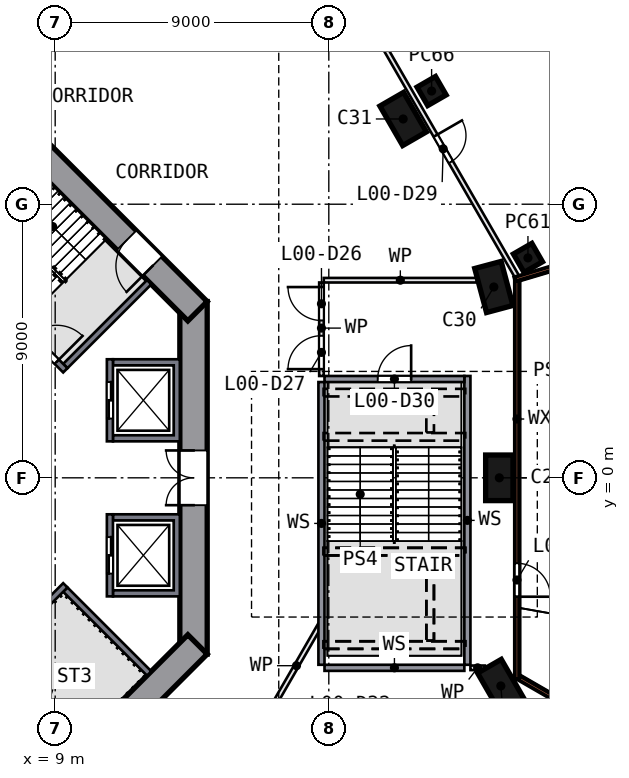
"""IFC4 building model, lengths in metres.
Left out: names, types, materials, properties, quantities, classifications, styles, units other than length and angle.
Written with IfcOpenShell. Run it as: python <this file> out.ifc"""

import sys

from ifc_helpers import new_model, si_unit, direction, frame, frame_2d, origin, origin_2d, place, context, subcontext, project, spatial, polyline, rectangle, outline, extrude, element, fill, save


model = new_model("IFC4")
c1 = context("Model", 3, precision=1e-05, world=origin(), true_north=direction((0.0, 1.0)))
c2 = subcontext(c1, "Body", "Model", "MODEL_VIEW")
j1 = project(units=[si_unit("LENGTHUNIT", "METRE"), si_unit("PLANEANGLEUNIT", "RADIAN")], contexts=[c1])
p1 = place(None, origin())
s1 = spatial("IfcSite", under=j1, at=p1, CompositionType="ELEMENT")
p2 = place(p1, origin())
s2 = spatial("IfcBuilding", under=s1, at=p2, CompositionType="ELEMENT")
p3 = place(p2, origin())
s3 = spatial("IfcBuildingStorey", under=s2, at=p3, CompositionType="ELEMENT", Elevation=0.0)
for number, where, z_axis, x_axis in (
    (1, (23.658, -6.846, 0.0), (0.0, 0.0, 1.0), (0.5, -0.866, 0.0)),
    (2, (23.608, 0.0, 0.0), (0.0, 0.0, 1.0), (0.0, 1.0, 0.0)),
    (3, (23.428, 6.278, 0.0), (0.0, 0.0, 1.0), (0.259, -0.966, 0.0)),
    (4, (20.445, 11.804, 0.0), (0.0, 0.0, 1.0), (-0.5, 0.866, 0.0)),
):
    element("IfcColumn", number, at=place(p3, frame(where, z_axis=z_axis, x_axis=x_axis)), inside=s3, PredefinedType="COLUMN", context=c2, shape_type="SweptSolid", body=[
        extrude(rectangle(XDim=1.5, YDim=0.9, at=origin_2d()), origin(), (0.0, 0.0, 1.0), 7.55),
    ])
p4 = place(p3, frame((13.55, -5.799, 0.0), z_axis=(0.0, 0.0, 1.0), x_axis=(0.0, 1.0, 0.0)))
e5 = element("IfcWall", 5, at=p4, inside=s3, PredefinedType="SHEAR", context=c2, shape_type="SweptSolid", body=[
    extrude(rectangle(XDim=11.598, YDim=0.9, at=frame_2d((5.799, 0.0))), origin(), (0.0, 0.0, 1.0), 8.0),
])
p5 = place(p4, frame((4.899, 0.0, 0.0)))
e6 = element("IfcOpeningElement", 6, at=p5, cuts=e5, PredefinedType="OPENING", context=c2, shape_type="SweptSolid", body=[
    extrude(rectangle(XDim=1.8, YDim=2.1, at=frame_2d((0.9, 1.05))), frame((0.0, 0.46, 0.0), z_axis=(0.0, -1.0, 0.0), x_axis=(1.0, 0.0, 0.0)), (0.0, 0.0, 1.0), 0.92),
])
p6 = place(p3, frame((13.682, 5.481, 0.0), z_axis=(0.0, 0.0, 1.0), x_axis=(-0.707106781, 0.707106781, 0.0)))
e7 = element("IfcWall", 7, at=p6, inside=s3, PredefinedType="SHEAR", context=c2, shape_type="SweptSolid", body=[
    extrude(rectangle(XDim=11.598, YDim=0.9, at=frame_2d((5.799, 0.0))), origin(), (0.0, 0.0, 1.0), 8.0),
])
p7 = place(p6, frame((2.099, 0.0, 0.0)))
e8 = element("IfcOpeningElement", 8, at=p7, cuts=e7, PredefinedType="OPENING", context=c2, shape_type="SweptSolid", body=[
    extrude(rectangle(XDim=1.2, YDim=2.1, at=frame_2d((0.6, 1.05))), frame((0.0, 0.46, 0.0), z_axis=(0.0, -1.0, 0.0), x_axis=(1.0, 0.0, 0.0)), (0.0, 0.0, 1.0), 0.92),
])
p8 = place(p3, frame((5.481, -13.682, 0.0), z_axis=(0.0, 0.0, 1.0), x_axis=(0.707106781, 0.707106781, 0.0)))
e9 = element("IfcWall", 9, at=p8, inside=s3, PredefinedType="SHEAR", context=c2, shape_type="SweptSolid", body=[
    extrude(rectangle(XDim=11.598, YDim=0.9, at=frame_2d((5.799, 0.0))), origin(), (0.0, 0.0, 1.0), 8.0),
])
p9 = place(p8, frame((2.099, 0.0, 0.0)))
e10 = element("IfcOpeningElement", 10, at=p9, cuts=e9, PredefinedType="OPENING", context=c2, shape_type="SweptSolid", body=[
    extrude(rectangle(XDim=1.2, YDim=2.1, at=frame_2d((0.6, 1.05))), frame((0.0, 0.46, 0.0), z_axis=(0.0, -1.0, 0.0), x_axis=(1.0, 0.0, 0.0)), (0.0, 0.0, 1.0), 0.92),
])
for number, where, z_axis, x_axis in (
    (11, (24.55, 7.234, 0.0), (0.0, 0.0, 1.0), (0.866, 0.5, 0.0)),
    (12, (21.381, 12.723, 0.0), (0.0, 0.0, 1.0), (0.866, 0.5, 0.0)),
):
    element("IfcColumn", number, at=place(p3, frame(where, z_axis=z_axis, x_axis=x_axis)), inside=s3, PredefinedType="COLUMN", context=c2, shape_type="SweptSolid", body=[
        extrude(rectangle(XDim=0.7, YDim=0.7, at=origin_2d()), origin(), (0.0, 0.0, 1.0), 8.0),
    ])
p10 = place(p3, frame((33.751, -12.062, 0.0), z_axis=(0.0, 0.0, 1.0), x_axis=(-0.86602647, 0.499998154, 0.0)))
e13 = element("IfcWall", 13, at=p10, inside=s3, PredefinedType="SOLIDWALL", context=c2, shape_type="SweptSolid", body=[
    extrude(rectangle(XDim=10.961, YDim=0.14, at=frame_2d((5.481, 0.0))), origin(), (0.0, 0.0, 1.0), 7.55),
])
p11 = place(p10, frame((6.702, 0.0, 0.15)))
e14 = element("IfcOpeningElement", 14, at=p11, cuts=e13, PredefinedType="OPENING", context=c2, shape_type="SweptSolid", body=[
    extrude(rectangle(XDim=3.0, YDim=4.2, at=frame_2d((1.5, 2.1))), frame((0.0, 0.08, 0.0), z_axis=(0.0, -1.0, 0.0), x_axis=(1.0, 0.0, 0.0)), (0.0, 0.0, 1.0), 0.16),
])
p12 = place(p3, frame((24.188, 6.479, 0.0), z_axis=(0.0, 0.0, 1.0), x_axis=(0.0, -1.0, 0.0)))
e15 = element("IfcWall", 15, at=p12, inside=s3, PredefinedType="SOLIDWALL", context=c2, shape_type="SweptSolid", body=[
    extrude(rectangle(XDim=13.1, YDim=0.14, at=frame_2d((6.55, 0.0))), origin(), (0.0, 0.0, 1.0), 7.55),
])
p13 = place(p12, frame((9.29, 0.0, 0.0)))
e16 = element("IfcOpeningElement", 16, at=p13, cuts=e15, PredefinedType="OPENING", context=c2, shape_type="SweptSolid", body=[
    extrude(rectangle(XDim=1.1, YDim=2.4, at=frame_2d((0.55, 1.2))), frame((0.0, 0.08, 0.0), z_axis=(0.0, -1.0, 0.0), x_axis=(1.0, 0.0, 0.0)), (0.0, 0.0, 1.0), 0.16),
])
p14 = place(p3, frame((24.118, 6.531, 0.0), z_axis=(0.0, 0.0, 1.0), x_axis=(0.958329382, 0.28566553, 0.0)))
e17 = element("IfcWall", 17, at=p14, inside=s3, PredefinedType="SOLIDWALL", context=c2, shape_type="SweptSolid", body=[
    extrude(rectangle(XDim=12.398, YDim=0.14, at=frame_2d((6.199, 0.0))), origin(), (0.0, 0.0, 1.0), 7.55),
])
p15 = place(p3, origin())
e18 = element("IfcWall", 18, at=p15, inside=s3, PredefinedType="SOLIDWALL", context=c2, shape_type="SweptSolid", body=[
    extrude(outline(polyline([(13.1, -3.9), (10.9, -3.9), (10.9, -3.7), (12.9, -3.7), (12.9, -1.4), (10.9, -1.4), (10.9, -1.2), (13.1, -1.2), (13.1, -3.9)])), origin(), (0.0, 0.0, 1.0), 7.55),
])
p16 = place(p3, frame((10.8, -1.2, 0.0), z_axis=(0.0, 0.0, 1.0), x_axis=(0.0, -1.0, 0.0)))
e19 = element("IfcWall", 19, at=p16, inside=s3, PredefinedType="SOLIDWALL", context=c2, shape_type="SweptSolid", body=[
    extrude(rectangle(XDim=2.7, YDim=0.2, at=frame_2d((1.35, 0.0))), origin(), (0.0, 0.0, 1.0), 7.55),
])
p17 = place(p16, frame((0.75, 0.0, 0.0)))
e20 = element("IfcOpeningElement", 20, at=p17, cuts=e19, PredefinedType="OPENING", context=c2, shape_type="SweptSolid", body=[
    extrude(rectangle(XDim=1.2, YDim=2.1, at=frame_2d((0.6, 1.05))), frame((0.0, 0.11, 0.0), z_axis=(0.0, -1.0, 0.0), x_axis=(1.0, 0.0, 0.0)), (0.0, 0.0, 1.0), 0.22),
])
p18 = place(p3, origin())
e21 = element("IfcWall", 21, at=p18, inside=s3, PredefinedType="SOLIDWALL", context=c2, shape_type="SweptSolid", body=[
    extrude(outline(polyline([(13.1, 3.9), (13.1, 1.2), (10.9, 1.2), (10.9, 1.4), (12.9, 1.4), (12.9, 3.7), (10.9, 3.7), (10.9, 3.9), (13.1, 3.9)])), origin(), (0.0, 0.0, 1.0), 7.55),
])
p19 = place(p3, frame((10.8, 1.2, 0.0), z_axis=(0.0, 0.0, 1.0), x_axis=(0.0, 1.0, 0.0)))
e22 = element("IfcWall", 22, at=p19, inside=s3, PredefinedType="SOLIDWALL", context=c2, shape_type="SweptSolid", body=[
    extrude(rectangle(XDim=2.7, YDim=0.2, at=frame_2d((1.35, 0.0))), origin(), (0.0, 0.0, 1.0), 7.55),
])
p20 = place(p19, frame((0.75, 0.0, 0.0)))
e23 = element("IfcOpeningElement", 23, at=p20, cuts=e22, PredefinedType="OPENING", context=c2, shape_type="SweptSolid", body=[
    extrude(rectangle(XDim=1.2, YDim=2.1, at=frame_2d((0.6, 1.05))), frame((0.0, 0.11, 0.0), z_axis=(0.0, -1.0, 0.0), x_axis=(1.0, 0.0, 0.0)), (0.0, 0.0, 1.0), 0.22),
])
p21 = place(p3, frame((3.535, 9.334, 0.0), z_axis=(0.0, 0.0, 1.0), x_axis=(0.707106781, -0.707106781, 0.0)))
e24 = element("IfcWall", 24, at=p21, inside=s3, PredefinedType="SOLIDWALL", context=c2, shape_type="SweptSolid", body=[
    extrude(rectangle(XDim=8.2, YDim=0.2, at=frame_2d((4.1, 0.0))), origin(), (0.0, 0.0, 1.0), 7.55),
])
p22 = place(p21, frame((6.6, 0.0, 0.0)))
e25 = element("IfcOpeningElement", 25, at=p22, cuts=e24, PredefinedType="OPENING", context=c2, shape_type="SweptSolid", body=[
    extrude(rectangle(XDim=1.2, YDim=2.1, at=frame_2d((0.6, 1.05))), frame((0.0, 0.11, 0.0), z_axis=(0.0, -1.0, 0.0), x_axis=(1.0, 0.0, 0.0)), (0.0, 0.0, 1.0), 0.22),
])
p23 = place(p3, frame((9.334, 3.677, 0.0), z_axis=(0.0, 0.0, 1.0), x_axis=(0.707106781, 0.707106781, 0.0)))
e26 = element("IfcWall", 26, at=p23, inside=s3, PredefinedType="SOLIDWALL", context=c2, shape_type="SweptSolid", body=[
    extrude(rectangle(XDim=3.9, YDim=0.2, at=frame_2d((1.95, 0.0))), origin(), (0.0, 0.0, 1.0), 7.55),
])
p24 = place(p3, frame((9.334, -3.535, 0.0), z_axis=(0.0, 0.0, 1.0), x_axis=(-0.707106781, -0.707106781, 0.0)))
e27 = element("IfcWall", 27, at=p24, inside=s3, PredefinedType="SOLIDWALL", context=c2, shape_type="SweptSolid", body=[
    extrude(rectangle(XDim=8.2, YDim=0.2, at=frame_2d((4.1, 0.0))), origin(), (0.0, 0.0, 1.0), 7.55),
])
p25 = place(p24, frame((6.6, 0.0, 0.0)))
e28 = element("IfcOpeningElement", 28, at=p25, cuts=e27, PredefinedType="OPENING", context=c2, shape_type="SweptSolid", body=[
    extrude(rectangle(XDim=1.2, YDim=2.1, at=frame_2d((0.6, 1.05))), frame((0.0, 0.11, 0.0), z_axis=(0.0, -1.0, 0.0), x_axis=(1.0, 0.0, 0.0)), (0.0, 0.0, 1.0), 0.22),
])
p26 = place(p3, frame((9.334, -3.677, 0.0), z_axis=(0.0, 0.0, 1.0), x_axis=(0.707106781, -0.707106781, 0.0)))
e29 = element("IfcWall", 29, at=p26, inside=s3, PredefinedType="SOLIDWALL", context=c2, shape_type="SweptSolid", body=[
    extrude(rectangle(XDim=3.9, YDim=0.2, at=frame_2d((1.95, 0.0))), origin(), (0.0, 0.0, 1.0), 7.55),
])
p27 = place(p3, frame((17.858, -6.25, 0.0), z_axis=(0.0, 0.0, 1.0), x_axis=(1.0, 0.0, 0.0)))
e30 = element("IfcWall", 30, at=p27, inside=s3, PredefinedType="SOLIDWALL", context=c2, shape_type="SweptSolid", body=[
    extrude(rectangle(XDim=4.6, YDim=0.2, at=frame_2d((2.3, 0.0))), origin(), (0.0, 0.0, 1.0), 7.55),
])
p28 = place(p3, frame((17.708, -4.845, 0.0), z_axis=(0.0, 0.0, 1.0), x_axis=(-0.499996601, -0.866027366, 0.0)))
e31 = element("IfcWall", 31, at=p28, inside=s3, PredefinedType="PARTITIONING", context=c2, shape_type="SweptSolid", body=[
    extrude(rectangle(XDim=3.083, YDim=0.15, at=frame_2d((1.542, 0.0))), origin(), (0.0, 0.0, 1.0), 7.55),
])
p29 = place(p3, frame((17.758, 3.15, 0.0), z_axis=(0.0, 0.0, 1.0), x_axis=(0.0, -1.0, 0.0)))
e32 = element("IfcWall", 32, at=p29, inside=s3, PredefinedType="SOLIDWALL", context=c2, shape_type="SweptSolid", body=[
    extrude(rectangle(XDim=9.3, YDim=0.2, at=frame_2d((4.65, 0.0))), origin(), (0.0, 0.0, 1.0), 7.55),
])
p30 = place(p3, frame((17.758, 3.35, 0.0), z_axis=(0.0, 0.0, 1.0), x_axis=(0.0, 1.0, 0.0)))
e33 = element("IfcWall", 33, at=p30, inside=s3, PredefinedType="PARTITIONING", context=c2, shape_type="SweptSolid", body=[
    extrude(rectangle(XDim=3.075, YDim=0.15, at=frame_2d((1.538, 0.0))), origin(), (0.0, 0.0, 1.0), 7.55),
])
p31 = place(p30, frame((1.825, 0.0, 0.0)))
e34 = element("IfcOpeningElement", 34, at=p31, cuts=e33, PredefinedType="OPENING", context=c2, shape_type="SweptSolid", body=[
    extrude(rectangle(XDim=1.1, YDim=2.1, at=frame_2d((0.55, 1.05))), frame((0.0, 0.085, 0.0), z_axis=(0.0, -1.0, 0.0), x_axis=(1.0, 0.0, 0.0)), (0.0, 0.0, 1.0), 0.17),
])
p32 = place(p30, frame((0.225, 0.0, 0.0)))
e35 = element("IfcOpeningElement", 35, at=p32, cuts=e33, PredefinedType="OPENING", context=c2, shape_type="SweptSolid", body=[
    extrude(rectangle(XDim=1.1, YDim=2.1, at=frame_2d((0.55, 1.05))), frame((0.0, 0.085, 0.0), z_axis=(0.0, -1.0, 0.0), x_axis=(1.0, 0.0, 0.0)), (0.0, 0.0, 1.0), 0.17),
])
p33 = place(p3, frame((19.037, 15.543, 0.0), z_axis=(0.0, 0.0, 1.0), x_axis=(0.499986809, -0.866033019, 0.0)))
e36 = element("IfcWall", 36, at=p33, inside=s3, PredefinedType="PARTITIONING", context=c2, shape_type="SweptSolid", body=[
    extrude(rectangle(XDim=10.366, YDim=0.15, at=frame_2d((5.183, 0.0))), origin(), (0.0, 0.0, 1.0), 7.55),
])
p34 = place(p33, frame((4.95, 0.0, 0.0)))
e37 = element("IfcOpeningElement", 37, at=p34, cuts=e36, PredefinedType="OPENING", context=c2, shape_type="SweptSolid", body=[
    extrude(rectangle(XDim=1.0, YDim=2.1, at=frame_2d((0.5, 1.05))), frame((0.0, 0.085, 0.0), z_axis=(0.0, -1.0, 0.0), x_axis=(1.0, 0.0, 0.0)), (0.0, 0.0, 1.0), 0.17),
])
p35 = place(p3, frame((22.558, -6.15, 0.0), z_axis=(0.0, 0.0, 1.0), x_axis=(0.0, 1.0, 0.0)))
e38 = element("IfcWall", 38, at=p35, inside=s3, PredefinedType="SOLIDWALL", context=c2, shape_type="SweptSolid", body=[
    extrude(rectangle(XDim=9.5, YDim=0.2, at=frame_2d((4.75, 0.0))), origin(), (0.0, 0.0, 1.0), 7.55),
])
p36 = place(p3, frame((22.658, -6.25, 0.0), z_axis=(0.0, 0.0, 1.0), x_axis=(1.0, 0.0, 0.0)))
e39 = element("IfcWall", 39, at=p36, inside=s3, PredefinedType="PARTITIONING", context=c2, shape_type="SweptSolid", body=[
    extrude(rectangle(XDim=0.473, YDim=0.15, at=frame_2d((0.237, 0.0))), origin(), (0.0, 0.0, 1.0), 7.55),
])
p37 = place(p3, frame((17.858, 3.25, 0.0), z_axis=(0.0, 0.0, 1.0), x_axis=(1.0, 0.0, 0.0)))
e40 = element("IfcWall", 40, at=p37, inside=s3, PredefinedType="SOLIDWALL", context=c2, shape_type="SweptSolid", body=[
    extrude(rectangle(XDim=4.6, YDim=0.2, at=frame_2d((2.3, 0.0))), origin(), (0.0, 0.0, 1.0), 7.55),
])
p38 = place(p37, frame((1.75, 0.0, 0.0)))
e41 = element("IfcOpeningElement", 41, at=p38, cuts=e40, PredefinedType="OPENING", context=c2, shape_type="SweptSolid", body=[
    extrude(rectangle(XDim=1.1, YDim=2.1, at=frame_2d((0.55, 1.05))), frame((0.0, 0.11, 0.0), z_axis=(0.0, -1.0, 0.0), x_axis=(1.0, 0.0, 0.0)), (0.0, 0.0, 1.0), 0.22),
])
p39 = place(p3, frame((22.872, 6.5, 0.0), z_axis=(0.0, 0.0, 1.0), x_axis=(-1.0, 0.0, 0.0)))
e42 = element("IfcWall", 42, at=p39, inside=s3, PredefinedType="PARTITIONING", context=c2, shape_type="SweptSolid", body=[
    extrude(rectangle(XDim=5.038, YDim=0.15, at=frame_2d((2.519, 0.0))), origin(), (0.0, 0.0, 1.0), 7.55),
])
p40 = place(p13, origin())
e43 = element("IfcDoor", 43, at=p40, inside=s3, OperationType="SINGLE_SWING_RIGHT", PredefinedType="DOOR", context=c2, shape_type="SweptSolid", body=[
    extrude(rectangle(XDim=1.1, YDim=2.4, at=frame_2d((0.55, 1.2))), frame((0.0, 0.025, 0.0), z_axis=(0.0, -1.0, 0.0), x_axis=(1.0, 0.0, 0.0)), (0.0, 0.0, 1.0), 0.05),
])
fill(e16, e43)
p41 = place(p17, origin())
e44 = element("IfcDoor", 44, at=p41, inside=s3, OperationType="DOUBLE_DOOR_SLIDING", PredefinedType="DOOR", context=c2, shape_type="SweptSolid", body=[
    extrude(rectangle(XDim=1.2, YDim=2.1, at=frame_2d((0.6, 1.05))), frame((0.0, 0.025, 0.0), z_axis=(0.0, -1.0, 0.0), x_axis=(1.0, 0.0, 0.0)), (0.0, 0.0, 1.0), 0.05),
])
fill(e20, e44)
p42 = place(p20, origin())
e45 = element("IfcDoor", 45, at=p42, inside=s3, OperationType="DOUBLE_DOOR_SLIDING", PredefinedType="DOOR", context=c2, shape_type="SweptSolid", body=[
    extrude(rectangle(XDim=1.2, YDim=2.1, at=frame_2d((0.6, 1.05))), frame((0.0, 0.025, 0.0), z_axis=(0.0, -1.0, 0.0), x_axis=(1.0, 0.0, 0.0)), (0.0, 0.0, 1.0), 0.05),
])
fill(e23, e45)
p43 = place(p22, origin())
e46 = element("IfcDoor", 46, at=p43, inside=s3, OperationType="SINGLE_SWING_RIGHT", PredefinedType="DOOR", context=c2, shape_type="SweptSolid", body=[
    extrude(rectangle(XDim=1.2, YDim=2.1, at=frame_2d((0.6, 1.05))), frame((0.0, 0.025, 0.0), z_axis=(0.0, -1.0, 0.0), x_axis=(1.0, 0.0, 0.0)), (0.0, 0.0, 1.0), 0.05),
])
fill(e25, e46)
p44 = place(p5, origin())
e47 = element("IfcDoor", 47, at=p44, inside=s3, OperationType="DOUBLE_DOOR_SINGLE_SWING", PredefinedType="DOOR", context=c2, shape_type="SweptSolid", body=[
    extrude(rectangle(XDim=1.8, YDim=2.1, at=frame_2d((0.9, 1.05))), frame((0.0, 0.025, 0.0), z_axis=(0.0, -1.0, 0.0), x_axis=(1.0, 0.0, 0.0)), (0.0, 0.0, 1.0), 0.05),
])
fill(e6, e47)
p45 = place(p7, origin())
e48 = element("IfcDoor", 48, at=p45, inside=s3, OperationType="SINGLE_SWING_LEFT", PredefinedType="DOOR", context=c2, shape_type="SweptSolid", body=[
    extrude(rectangle(XDim=1.2, YDim=2.1, at=frame_2d((0.6, 1.05))), frame((0.0, 0.025, 0.0), z_axis=(0.0, -1.0, 0.0), x_axis=(1.0, 0.0, 0.0)), (0.0, 0.0, 1.0), 0.05),
])
fill(e8, e48)
p46 = place(p31, origin())
e49 = element("IfcDoor", 49, at=p46, inside=s3, OperationType="SINGLE_SWING_RIGHT", PredefinedType="DOOR", context=c2, shape_type="SweptSolid", body=[
    extrude(rectangle(XDim=1.1, YDim=2.1, at=frame_2d((0.55, 1.05))), frame((0.0, 0.025, 0.0), z_axis=(0.0, -1.0, 0.0), x_axis=(1.0, 0.0, 0.0)), (0.0, 0.0, 1.0), 0.05),
])
fill(e34, e49)
p47 = place(p32, origin())
e50 = element("IfcDoor", 50, at=p47, inside=s3, OperationType="SINGLE_SWING_LEFT", PredefinedType="DOOR", context=c2, shape_type="SweptSolid", body=[
    extrude(rectangle(XDim=1.1, YDim=2.1, at=frame_2d((0.55, 1.05))), frame((0.0, 0.025, 0.0), z_axis=(0.0, -1.0, 0.0), x_axis=(1.0, 0.0, 0.0)), (0.0, 0.0, 1.0), 0.05),
])
fill(e35, e50)
p48 = place(p34, origin())
e51 = element("IfcDoor", 51, at=p48, inside=s3, OperationType="SINGLE_SWING_LEFT", PredefinedType="DOOR", context=c2, shape_type="SweptSolid", body=[
    extrude(rectangle(XDim=1.0, YDim=2.1, at=frame_2d((0.5, 1.05))), frame((0.0, 0.025, 0.0), z_axis=(0.0, -1.0, 0.0), x_axis=(1.0, 0.0, 0.0)), (0.0, 0.0, 1.0), 0.05),
])
fill(e37, e51)
p49 = place(p38, origin())
e52 = element("IfcDoor", 52, at=p49, inside=s3, OperationType="SINGLE_SWING_RIGHT", PredefinedType="DOOR", context=c2, shape_type="SweptSolid", body=[
    extrude(rectangle(XDim=1.1, YDim=2.1, at=frame_2d((0.55, 1.05))), frame((0.0, 0.025, 0.0), z_axis=(0.0, -1.0, 0.0), x_axis=(1.0, 0.0, 0.0)), (0.0, 0.0, 1.0), 0.05),
])
fill(e41, e52)
save(model, sys.argv[1])
